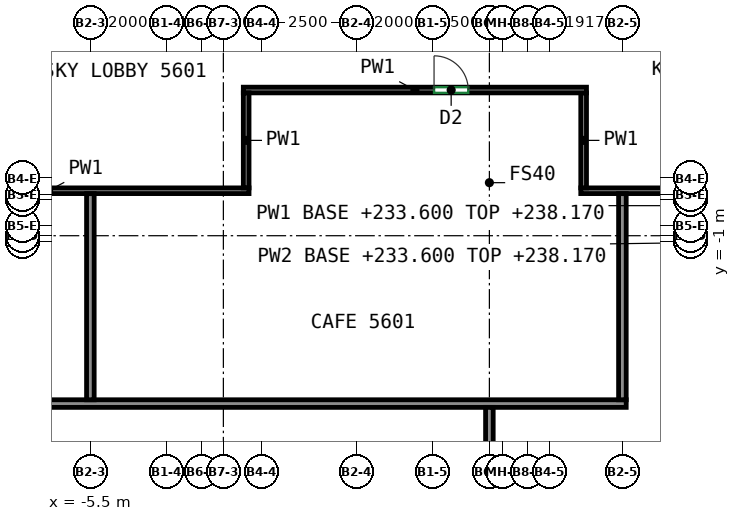
"""IFC4 building model, lengths in metres.
Left out: names, types, materials, properties, quantities, classifications, styles, units other than length and angle.
Written with IfcOpenShell. Run it as: python <this file> out.ifc"""

import sys

from ifc_helpers import new_model, si_unit, direction, frame, frame_2d, origin, place, context, subcontext, project, spatial, rectangle, extrude, element, fill, save


model = new_model("IFC4")
c1 = context("Model", 3, precision=1e-05, world=origin(), true_north=direction((0.0, 1.0)))
c2 = subcontext(c1, "Body", "Model", "MODEL_VIEW")
j1 = project(units=[si_unit("LENGTHUNIT", "METRE"), si_unit("PLANEANGLEUNIT", "RADIAN")], contexts=[c1])
p1 = place(None, origin())
s1 = spatial("IfcSite", under=j1, at=p1, CompositionType="ELEMENT")
p2 = place(p1, origin())
s2 = spatial("IfcBuilding", under=s1, at=p2, CompositionType="ELEMENT")
p3 = place(p2, frame((0.0, 0.0, 233.6)))
s3 = spatial("IfcBuildingStorey", under=s2, at=p3, CompositionType="ELEMENT", Elevation=233.6)
p4 = place(p3, frame((-11.875, 0.35, 0.0), z_axis=(0.0, 0.0, 1.0), x_axis=(1.0, 0.0, 0.0)))
e1 = element("IfcWall", 1, at=p4, inside=s3, PredefinedType="PARTITIONING", context=c2, shape_type="SweptSolid", body=[
    extrude(rectangle(XDim=10.55, YDim=0.15, at=frame_2d((5.275, 0.0))), origin(), (0.0, 0.0, 1.0), 5.12),
])
p5 = place(p4, frame((1.42, 0.0, 0.0)))
e2 = element("IfcOpeningElement", 2, at=p5, cuts=e1, PredefinedType="OPENING", context=c2, shape_type="SweptSolid", body=[
    extrude(rectangle(XDim=0.9, YDim=2.1, at=frame_2d((0.45, 1.05))), frame((0.0, 0.085, 0.0), z_axis=(0.0, -1.0, 0.0), x_axis=(1.0, 0.0, 0.0)), (0.0, 0.0, 1.0), 0.17),
])
p6 = place(p3, frame((7.405, 0.35, 0.0), z_axis=(0.0, 0.0, 1.0), x_axis=(1.0, 0.0, 0.0)))
e3 = element("IfcWall", 3, at=p6, inside=s3, PredefinedType="PARTITIONING", context=c2, shape_type="SweptSolid", body=[
    extrude(rectangle(XDim=10.574, YDim=0.15, at=frame_2d((5.287, 0.0))), origin(), (0.0, 0.0, 1.0), 5.12),
])
p7 = place(p6, frame((6.651, 0.0, 0.0)))
e4 = element("IfcOpeningElement", 4, at=p7, cuts=e3, PredefinedType="OPENING", context=c2, shape_type="SweptSolid", body=[
    extrude(rectangle(XDim=1.8, YDim=2.1, at=frame_2d((0.9, 1.05))), frame((0.0, 0.085, 0.0), z_axis=(0.0, -1.0, 0.0), x_axis=(1.0, 0.0, 0.0)), (0.0, 0.0, 1.0), 0.17),
])
p8 = place(p3, frame((7.48, 2.925, 0.0), z_axis=(0.0, 0.0, 1.0), x_axis=(0.0, -1.0, 0.0)))
e5 = element("IfcWall", 5, at=p8, inside=s3, PredefinedType="PARTITIONING", context=c2, shape_type="SweptSolid", body=[
    extrude(rectangle(XDim=2.5, YDim=0.15, at=frame_2d((1.25, 0.0))), origin(), (0.0, 0.0, 1.0), 5.12),
])
p9 = place(p3, frame((-1.475, 3.0, 0.0), z_axis=(0.0, 0.0, 1.0), x_axis=(1.0, 0.0, 0.0)))
e6 = element("IfcWall", 6, at=p9, inside=s3, PredefinedType="PARTITIONING", context=c2, shape_type="SweptSolid", body=[
    extrude(rectangle(XDim=9.03, YDim=0.15, at=frame_2d((4.515, 0.0))), origin(), (0.0, 0.0, 1.0), 5.12),
])
p10 = place(p9, frame((5.019, 0.0, 0.0)))
e7 = element("IfcOpeningElement", 7, at=p10, cuts=e6, PredefinedType="OPENING", context=c2, shape_type="SweptSolid", body=[
    extrude(rectangle(XDim=0.9, YDim=2.1, at=frame_2d((0.45, 1.05))), frame((0.0, 0.085, 0.0), z_axis=(0.0, -1.0, 0.0), x_axis=(1.0, 0.0, 0.0)), (0.0, 0.0, 1.0), 0.17),
])
p11 = place(p3, frame((-1.4, 0.425, 0.0), z_axis=(0.0, 0.0, 1.0), x_axis=(0.0, 1.0, 0.0)))
e8 = element("IfcWall", 8, at=p11, inside=s3, PredefinedType="PARTITIONING", context=c2, shape_type="SweptSolid", body=[
    extrude(rectangle(XDim=2.5, YDim=0.15, at=frame_2d((1.25, 0.0))), origin(), (0.0, 0.0, 1.0), 5.12),
])
p12 = place(p3, frame((-11.873, -5.25, 0.0), z_axis=(0.0, 0.0, 1.0), x_axis=(1.0, 0.0, 0.0)))
e9 = element("IfcWall", 9, at=p12, inside=s3, PredefinedType="PARTITIONING", context=c2, shape_type="SweptSolid", body=[
    extrude(rectangle(XDim=20.473, YDim=0.2, at=frame_2d((10.237, 0.0))), origin(), (0.0, 0.0, 1.0), 5.12),
])
p13 = place(p3, frame((-5.5, -5.15, 0.0), z_axis=(0.0, 0.0, 1.0), x_axis=(0.0, 1.0, 0.0)))
e10 = element("IfcWall", 10, at=p13, inside=s3, PredefinedType="PARTITIONING", context=c2, shape_type="SweptSolid", body=[
    extrude(rectangle(XDim=5.423, YDim=0.2, at=frame_2d((2.711, 0.0))), origin(), (0.0, 0.0, 1.0), 5.12),
])
p14 = place(p3, frame((5.0, -17.7, 0.0), z_axis=(0.0, 0.0, 1.0), x_axis=(0.0, 1.0, 0.0)))
e11 = element("IfcWall", 11, at=p14, inside=s3, PredefinedType="PARTITIONING", context=c2, shape_type="SweptSolid", body=[
    extrude(rectangle(XDim=12.35, YDim=0.2, at=frame_2d((6.175, 0.0))), origin(), (0.0, 0.0, 1.0), 5.12),
])
p15 = place(p3, frame((8.5, -5.15, 0.0), z_axis=(0.0, 0.0, 1.0), x_axis=(0.0, 1.0, 0.0)))
e12 = element("IfcWall", 12, at=p15, inside=s3, PredefinedType="PARTITIONING", context=c2, shape_type="SweptSolid", body=[
    extrude(rectangle(XDim=5.423, YDim=0.2, at=frame_2d((2.711, 0.0))), origin(), (0.0, 0.0, 1.0), 5.12),
])
p16 = place(p10, origin())
e13 = element("IfcDoor", 13, at=p16, inside=s3, OperationType="SINGLE_SWING_LEFT", PredefinedType="DOOR", context=c2, shape_type="SweptSolid", body=[
    extrude(rectangle(XDim=0.9, YDim=2.1, at=frame_2d((0.45, 1.05))), frame((0.0, 0.025, 0.0), z_axis=(0.0, -1.0, 0.0), x_axis=(1.0, 0.0, 0.0)), (0.0, 0.0, 1.0), 0.05),
])
fill(e7, e13)
save(model, sys.argv[1])
